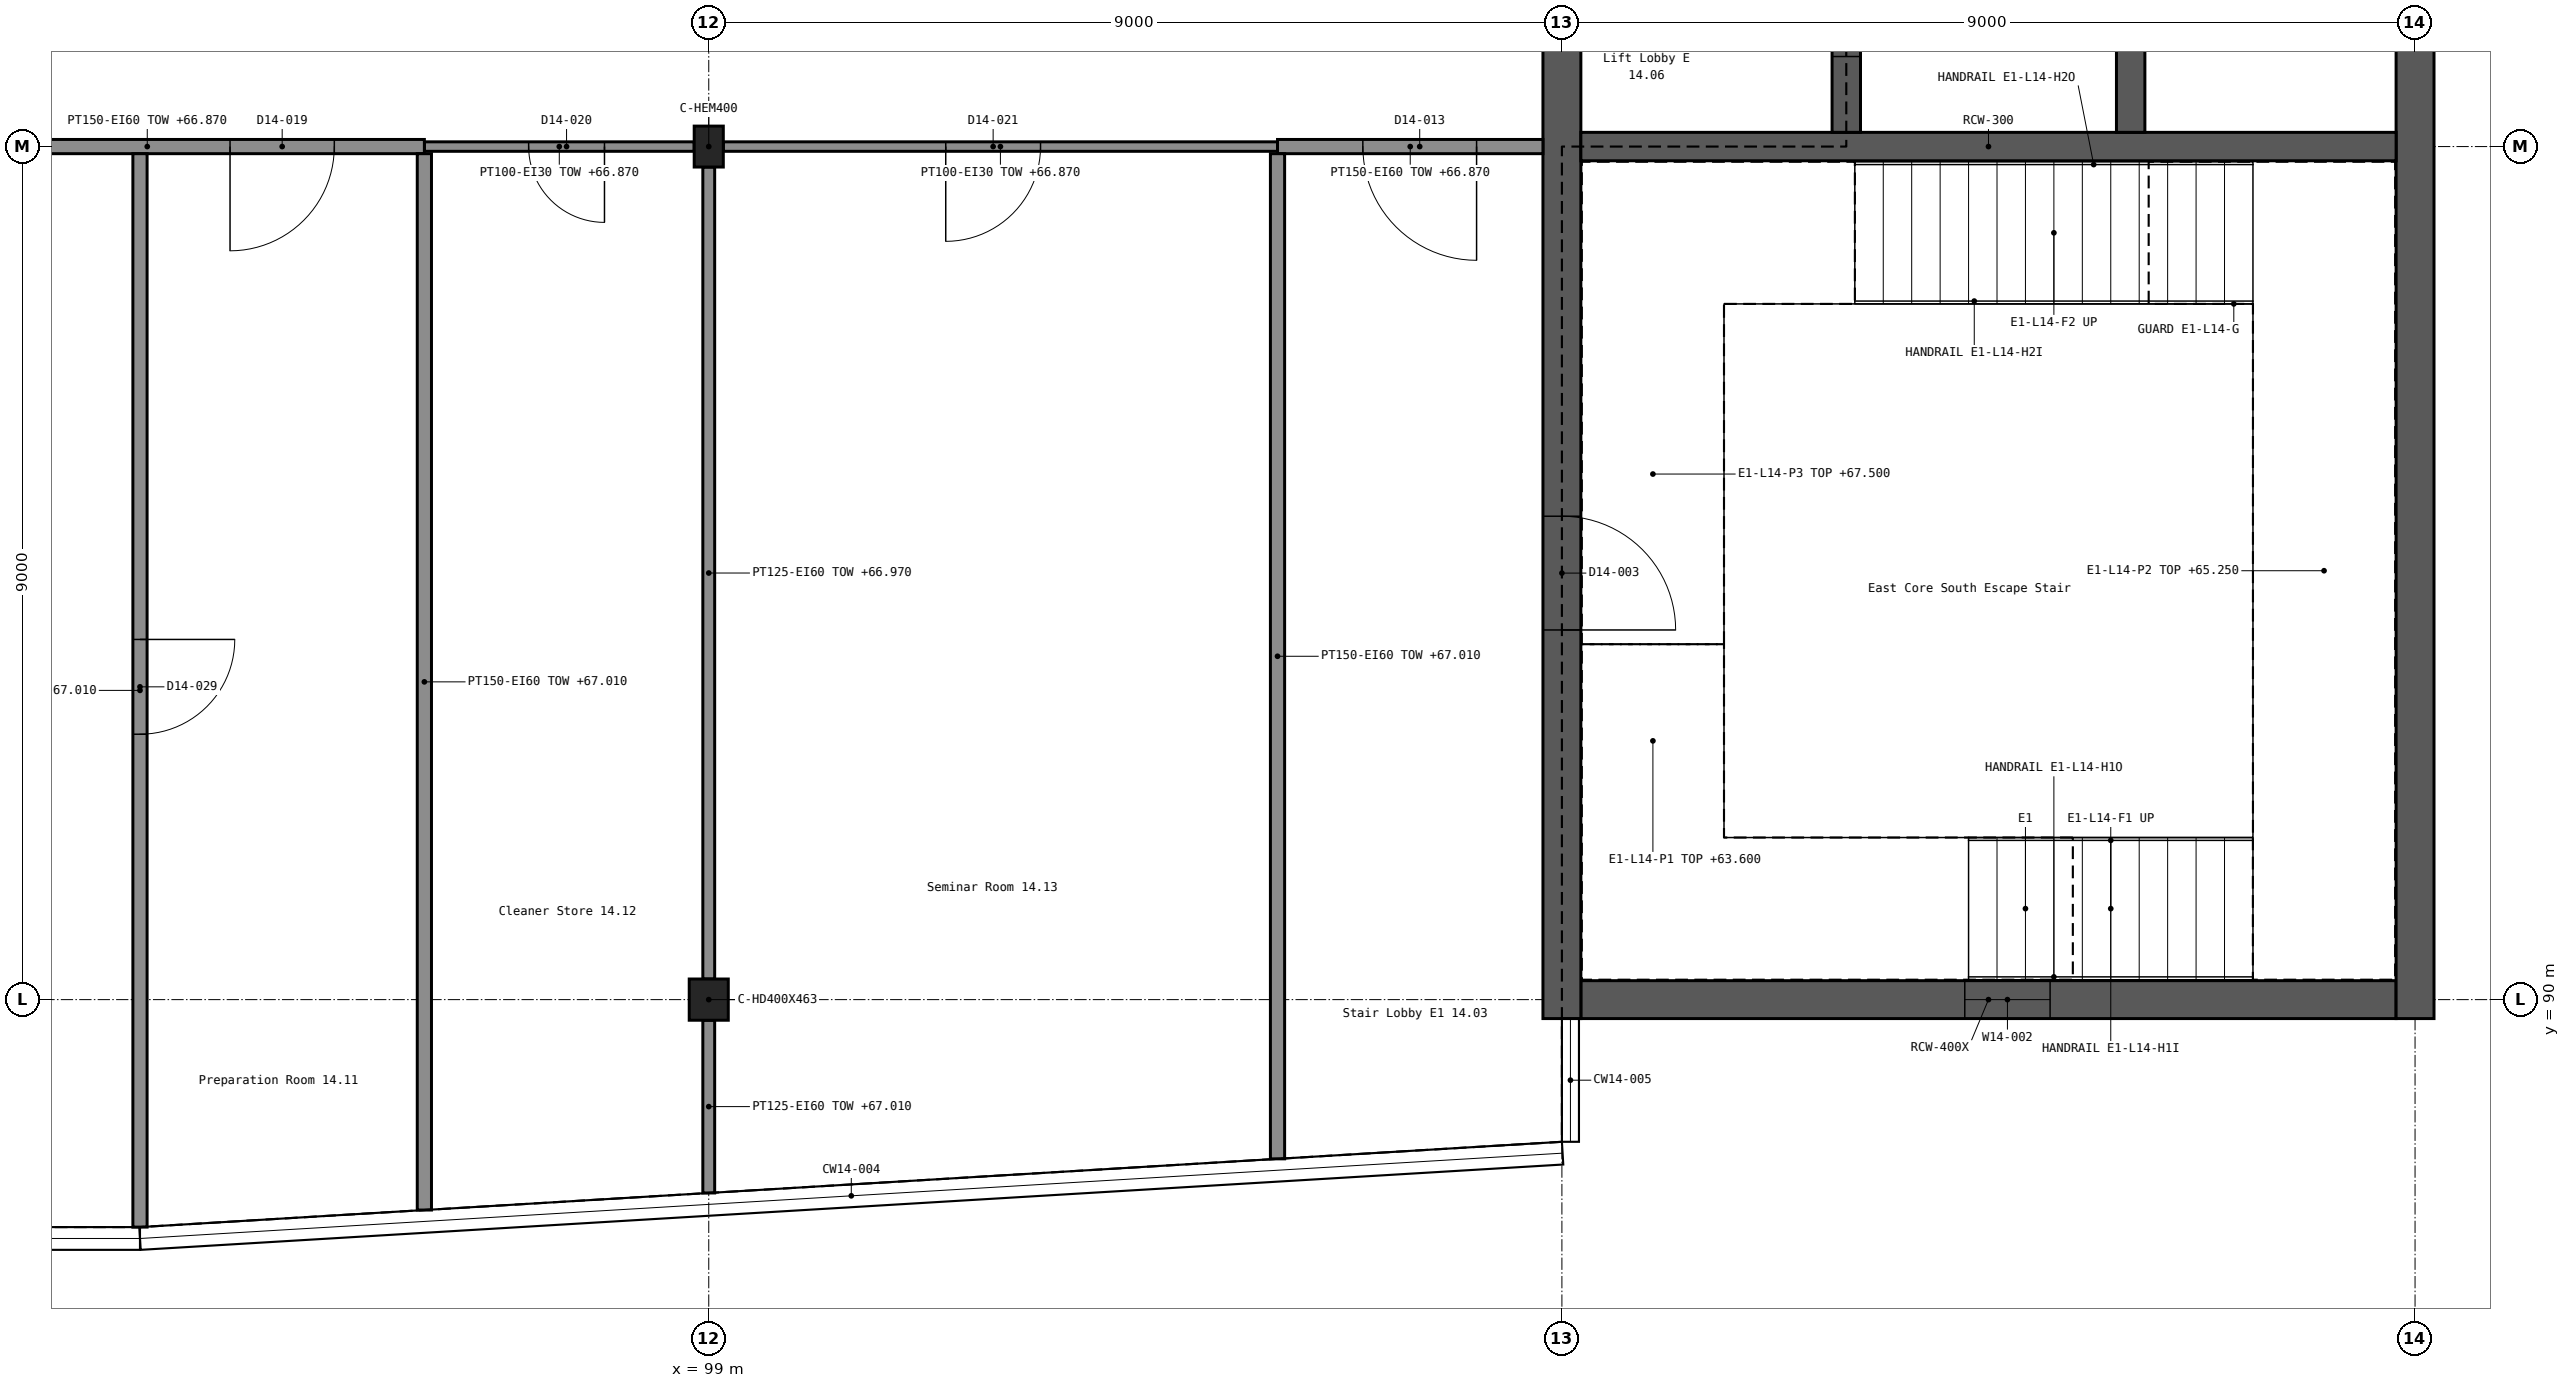
"""IFC4 building model, lengths in metres.
Left out: names, types, materials, properties, quantities, classifications, styles, units other than length and angle.
Written with IfcOpenShell. Run it as: python <this file> out.ifc"""

import sys

from ifc_helpers import new_model, si_unit, direction, frame, frame_2d, origin, origin_2d, place, context, subcontext, project, spatial, rectangle, i_section, extrude, element, fill, save


model = new_model("IFC4")
c1 = context("Model", 3, precision=1e-05, world=origin(), true_north=direction((0.0, 1.0)))
c2 = subcontext(c1, "Body", "Model", "MODEL_VIEW")
j1 = project(units=[si_unit("LENGTHUNIT", "METRE"), si_unit("PLANEANGLEUNIT", "RADIAN")], contexts=[c1])
p1 = place(None, origin())
s1 = spatial("IfcSite", under=j1, at=p1, CompositionType="ELEMENT")
p2 = place(p1, origin())
s2 = spatial("IfcBuilding", under=s1, at=p2, CompositionType="ELEMENT")
p3 = place(p2, frame((0.0, 0.0, 63.6)))
s3 = spatial("IfcBuildingStorey", under=s2, at=p3, CompositionType="ELEMENT", Elevation=63.6)
p4 = place(p3, frame((108.2, 90.0, 0.0), z_axis=(0.0, 0.0, 1.0), x_axis=(1.0, 0.0, 0.0)))
e1 = element("IfcWall", 1, at=p4, inside=s3, PredefinedType="SHEAR", context=c2, shape_type="SweptSolid", body=[
    extrude(rectangle(XDim=8.6, YDim=0.4, at=frame_2d((4.3, 0.0))), origin(), (0.0, 0.0, 1.0), 3.9),
])
p5 = place(p4, frame((4.05, 0.0, 1.2)))
e2 = element("IfcOpeningElement", 2, at=p5, cuts=e1, PredefinedType="OPENING", context=c2, shape_type="SweptSolid", body=[
    extrude(rectangle(XDim=0.9, YDim=1.5, at=frame_2d((0.45, 0.75))), frame((0.0, 0.211, 0.0), z_axis=(0.0, -1.0, 0.0), x_axis=(1.0, 0.0, 0.0)), (0.0, 0.0, 1.0), 0.422),
])
p6 = place(p3, frame((108.0, 89.8, 0.0), z_axis=(0.0, 0.0, 1.0), x_axis=(0.0, 1.0, 0.0)))
e3 = element("IfcWall", 3, at=p6, inside=s3, PredefinedType="SHEAR", context=c2, shape_type="SweptSolid", body=[
    extrude(rectangle(XDim=27.4, YDim=0.4, at=frame_2d((13.7, 0.0))), origin(), (0.0, 0.0, 1.0), 3.9),
])
p7 = place(p6, frame((4.1, 0.0, 0.0)))
e4 = element("IfcOpeningElement", 4, at=p7, cuts=e3, PredefinedType="OPENING", context=c2, shape_type="SweptSolid", body=[
    extrude(rectangle(XDim=1.2, YDim=2.1, at=frame_2d((0.6, 1.05))), frame((0.0, 0.211, 0.0), z_axis=(0.0, -1.0, 0.0), x_axis=(1.0, 0.0, 0.0)), (0.0, 0.0, 1.0), 0.422),
])
p8 = place(p6, frame((22.1, 0.0, 0.0)))
e5 = element("IfcOpeningElement", 5, at=p8, cuts=e3, PredefinedType="OPENING", context=c2, shape_type="SweptSolid", body=[
    extrude(rectangle(XDim=1.2, YDim=2.1, at=frame_2d((0.6, 1.05))), frame((0.0, 0.211, 0.0), z_axis=(0.0, -1.0, 0.0), x_axis=(1.0, 0.0, 0.0)), (0.0, 0.0, 1.0), 0.422),
])
p9 = place(p6, frame((12.5, 0.0, 0.0)))
e6 = element("IfcOpeningElement", 6, at=p9, cuts=e3, PredefinedType="OPENING", context=c2, shape_type="SweptSolid", body=[
    extrude(rectangle(XDim=2.0, YDim=2.1, at=frame_2d((1.0, 1.05))), frame((0.0, 0.211, 0.0), z_axis=(0.0, -1.0, 0.0), x_axis=(1.0, 0.0, 0.0)), (0.0, 0.0, 1.0), 0.422),
])
p10 = place(p3, frame((117.0, 89.8, 0.0), z_axis=(0.0, 0.0, 1.0), x_axis=(0.0, 1.0, 0.0)))
e7 = element("IfcWall", 7, at=p10, inside=s3, PredefinedType="SHEAR", context=c2, shape_type="SweptSolid", body=[
    extrude(rectangle(XDim=27.4, YDim=0.4, at=frame_2d((13.7, 0.0))), origin(), (0.0, 0.0, 1.0), 3.9),
])
p11 = place(p3, frame((108.2, 99.0, 0.0), z_axis=(0.0, 0.0, 1.0), x_axis=(1.0, 0.0, 0.0)))
e8 = element("IfcWall", 8, at=p11, inside=s3, PredefinedType="SHEAR", context=c2, shape_type="SweptSolid", body=[
    extrude(rectangle(XDim=8.6, YDim=0.3, at=frame_2d((4.3, 0.0))), origin(), (0.0, 0.0, 1.0), 3.9),
])
p12 = place(p3, frame((111.0, 99.15, 0.0), z_axis=(0.0, 0.0, 1.0), x_axis=(0.0, 1.0, 0.0)))
e9 = element("IfcWall", 9, at=p12, inside=s3, PredefinedType="SHEAR", context=c2, shape_type="SweptSolid", body=[
    extrude(rectangle(XDim=8.7, YDim=0.3, at=frame_2d((4.35, 0.0))), origin(), (0.0, 0.0, 1.0), 3.9),
])
p13 = place(p12, frame((0.8, 0.0, 0.0)))
e10 = element("IfcOpeningElement", 10, at=p13, cuts=e9, PredefinedType="OPENING", context=c2, shape_type="SweptSolid", body=[
    extrude(rectangle(XDim=1.1, YDim=2.1, at=frame_2d((0.55, 1.05))), frame((0.0, 0.161, 0.0), z_axis=(0.0, -1.0, 0.0), x_axis=(1.0, 0.0, 0.0)), (0.0, 0.0, 1.0), 0.322),
])
p14 = place(p12, frame((3.8, 0.0, 0.0)))
e11 = element("IfcOpeningElement", 11, at=p14, cuts=e9, PredefinedType="OPENING", context=c2, shape_type="SweptSolid", body=[
    extrude(rectangle(XDim=1.1, YDim=2.1, at=frame_2d((0.55, 1.05))), frame((0.0, 0.161, 0.0), z_axis=(0.0, -1.0, 0.0), x_axis=(1.0, 0.0, 0.0)), (0.0, 0.0, 1.0), 0.322),
])
p15 = place(p12, frame((6.8, 0.0, 0.0)))
e12 = element("IfcOpeningElement", 12, at=p15, cuts=e9, PredefinedType="OPENING", context=c2, shape_type="SweptSolid", body=[
    extrude(rectangle(XDim=1.1, YDim=2.1, at=frame_2d((0.55, 1.05))), frame((0.0, 0.161, 0.0), z_axis=(0.0, -1.0, 0.0), x_axis=(1.0, 0.0, 0.0)), (0.0, 0.0, 1.0), 0.322),
])
p16 = place(p3, frame((114.0, 99.15, 0.0), z_axis=(0.0, 0.0, 1.0), x_axis=(0.0, 1.0, 0.0)))
e13 = element("IfcWall", 13, at=p16, inside=s3, PredefinedType="SHEAR", context=c2, shape_type="SweptSolid", body=[
    extrude(rectangle(XDim=8.7, YDim=0.3, at=frame_2d((4.35, 0.0))), origin(), (0.0, 0.0, 1.0), 3.9),
])
p17 = place(p3, frame((99.0, 90.0, 0.0), z_axis=(0.0, 0.0, 1.0), x_axis=(1.0, 0.0, 0.0)))
e14 = element("IfcColumn", 14, at=p17, inside=s3, PredefinedType="COLUMN", context=c2, shape_type="SweptSolid", body=[
    extrude(i_section(OverallWidth=0.412, OverallDepth=0.435, WebThickness=0.036, FlangeThickness=0.057, FilletRadius=0.015, at=origin_2d()), origin(), (0.0, 0.0, 1.0), 3.9),
])
p18 = place(p3, frame((99.0, 99.0, 0.0), z_axis=(0.0, 0.0, 1.0), x_axis=(1.0, 0.0, 0.0)))
e15 = element("IfcColumn", 15, at=p18, inside=s3, PredefinedType="COLUMN", context=c2, shape_type="SweptSolid", body=[
    extrude(i_section(OverallWidth=0.307, OverallDepth=0.432, WebThickness=0.021, FlangeThickness=0.04, FilletRadius=0.027, at=origin_2d()), origin(), (0.0, 0.0, 1.0), 3.9),
])
p19 = place(p3, frame((96.0, 99.0, 0.0), z_axis=(0.0, 0.0, 1.0), x_axis=(1.0, 0.0, 0.0)))
e16 = element("IfcWall", 16, at=p19, inside=s3, PredefinedType="PARTITIONING", context=c2, shape_type="SweptSolid", body=[
    extrude(rectangle(XDim=2.846, YDim=0.1, at=frame_2d((1.423, 0.0))), origin(), (0.0, 0.0, 1.0), 3.27),
])
p20 = place(p19, frame((1.1, 0.0, 0.0)))
e17 = element("IfcOpeningElement", 17, at=p20, cuts=e16, PredefinedType="OPENING", context=c2, shape_type="SweptSolid", body=[
    extrude(rectangle(XDim=0.8, YDim=2.1, at=frame_2d((0.4, 1.05))), frame((0.0, 0.061, 0.0), z_axis=(0.0, -1.0, 0.0), x_axis=(1.0, 0.0, 0.0)), (0.0, 0.0, 1.0), 0.122),
])
p21 = place(p3, frame((99.154, 99.0, 0.0), z_axis=(0.0, 0.0, 1.0), x_axis=(1.0, 0.0, 0.0)))
e18 = element("IfcWall", 18, at=p21, inside=s3, PredefinedType="PARTITIONING", context=c2, shape_type="SweptSolid", body=[
    extrude(rectangle(XDim=5.846, YDim=0.1, at=frame_2d((2.923, 0.0))), origin(), (0.0, 0.0, 1.0), 3.27),
])
p22 = place(p21, frame((2.346, 0.0, 0.0)))
e19 = element("IfcOpeningElement", 19, at=p22, cuts=e18, PredefinedType="OPENING", context=c2, shape_type="SweptSolid", body=[
    extrude(rectangle(XDim=1.0, YDim=2.1, at=frame_2d((0.5, 1.05))), frame((0.0, 0.061, 0.0), z_axis=(0.0, -1.0, 0.0), x_axis=(1.0, 0.0, 0.0)), (0.0, 0.0, 1.0), 0.122),
])
p23 = place(p3, frame((90.154, 99.0, 0.0), z_axis=(0.0, 0.0, 1.0), x_axis=(1.0, 0.0, 0.0)))
e20 = element("IfcWall", 20, at=p23, inside=s3, PredefinedType="PARTITIONING", context=c2, shape_type="SweptSolid", body=[
    extrude(rectangle(XDim=5.846, YDim=0.15, at=frame_2d((2.923, 0.0))), origin(), (0.0, 0.0, 1.0), 3.27),
])
p24 = place(p23, frame((3.796, 0.0, 0.0)))
e21 = element("IfcOpeningElement", 21, at=p24, cuts=e20, PredefinedType="OPENING", context=c2, shape_type="SweptSolid", body=[
    extrude(rectangle(XDim=1.1, YDim=2.4, at=frame_2d((0.55, 1.2))), frame((0.0, 0.086, 0.0), z_axis=(0.0, -1.0, 0.0), x_axis=(1.0, 0.0, 0.0)), (0.0, 0.0, 1.0), 0.172),
])
p25 = place(p3, frame((105.0, 99.0, 0.0), z_axis=(0.0, 0.0, 1.0), x_axis=(1.0, 0.0, 0.0)))
e22 = element("IfcWall", 22, at=p25, inside=s3, PredefinedType="PARTITIONING", context=c2, shape_type="SweptSolid", body=[
    extrude(rectangle(XDim=2.8, YDim=0.15, at=frame_2d((1.4, 0.0))), origin(), (0.0, 0.0, 1.0), 3.27),
])
p26 = place(p25, frame((0.9, 0.0, 0.0)))
e23 = element("IfcOpeningElement", 23, at=p26, cuts=e22, PredefinedType="OPENING", context=c2, shape_type="SweptSolid", body=[
    extrude(rectangle(XDim=1.2, YDim=2.1, at=frame_2d((0.6, 1.05))), frame((0.0, 0.086, 0.0), z_axis=(0.0, -1.0, 0.0), x_axis=(1.0, 0.0, 0.0)), (0.0, 0.0, 1.0), 0.172),
])
p27 = place(p3, frame((93.0, 87.6, 0.0), z_axis=(0.0, 0.0, 1.0), x_axis=(0.0, 1.0, 0.0)))
e24 = element("IfcWall", 24, at=p27, inside=s3, PredefinedType="PARTITIONING", context=c2, shape_type="SweptSolid", body=[
    extrude(rectangle(XDim=11.325, YDim=0.15, at=frame_2d((5.663, 0.0))), origin(), (0.0, 0.0, 1.0), 3.41),
])
p28 = place(p27, frame((5.2, 0.0, 0.0)))
e25 = element("IfcOpeningElement", 25, at=p28, cuts=e24, PredefinedType="OPENING", context=c2, shape_type="SweptSolid", body=[
    extrude(rectangle(XDim=1.0, YDim=2.1, at=frame_2d((0.5, 1.05))), frame((0.0, 0.086, 0.0), z_axis=(0.0, -1.0, 0.0), x_axis=(1.0, 0.0, 0.0)), (0.0, 0.0, 1.0), 0.172),
])
p29 = place(p3, frame((96.0, 87.78, 0.0), z_axis=(0.0, 0.0, 1.0), x_axis=(0.0, 1.0, 0.0)))
e26 = element("IfcWall", 26, at=p29, inside=s3, PredefinedType="PARTITIONING", context=c2, shape_type="SweptSolid", body=[
    extrude(rectangle(XDim=11.145, YDim=0.15, at=frame_2d((5.573, 0.0))), origin(), (0.0, 0.0, 1.0), 3.41),
])
p30 = place(p3, frame((99.0, 87.96, 0.0), z_axis=(0.0, 0.0, 1.0), x_axis=(0.0, 1.0, 0.0)))
e27 = element("IfcWall", 27, at=p30, inside=s3, PredefinedType="PARTITIONING", context=c2, shape_type="SweptSolid", body=[
    extrude(rectangle(XDim=1.823, YDim=0.125, at=frame_2d((0.911, 0.0))), origin(), (0.0, 0.0, 1.0), 3.41),
])
p31 = place(p3, frame((99.0, 90.218, 0.0), z_axis=(0.0, 0.0, 1.0), x_axis=(0.0, 1.0, 0.0)))
e28 = element("IfcWall", 28, at=p31, inside=s3, PredefinedType="PARTITIONING", context=c2, shape_type="SweptSolid", body=[
    extrude(rectangle(XDim=8.566, YDim=0.125, at=frame_2d((4.283, 0.0))), origin(), (0.0, 0.0, 1.0), 3.37),
])
p32 = place(p3, frame((105.0, 88.32, 0.0), z_axis=(0.0, 0.0, 1.0), x_axis=(0.0, 1.0, 0.0)))
e29 = element("IfcWall", 29, at=p32, inside=s3, PredefinedType="PARTITIONING", context=c2, shape_type="SweptSolid", body=[
    extrude(rectangle(XDim=10.605, YDim=0.15, at=frame_2d((5.302, 0.0))), origin(), (0.0, 0.0, 1.0), 3.41),
])
p33 = place(p5, origin())
e30 = element("IfcWindow", 30, at=p33, inside=s3, PartitioningType="SINGLE_PANEL", PredefinedType="WINDOW", context=c2, shape_type="SweptSolid", body=[
    extrude(rectangle(XDim=0.9, YDim=1.5, at=frame_2d((0.45, 0.75))), frame((0.0, 0.03, 0.0), z_axis=(0.0, -1.0, 0.0), x_axis=(1.0, 0.0, 0.0)), (0.0, 0.0, 1.0), 0.06),
])
fill(e2, e30)
p34 = place(p7, frame((1.2, 0.0, 0.0), z_axis=(0.0, 0.0, 1.0), x_axis=(-1.0, 0.0, 0.0)))
e31 = element("IfcDoor", 31, at=p34, inside=s3, OperationType="SINGLE_SWING_RIGHT", PredefinedType="DOOR", context=c2, shape_type="SweptSolid", body=[
    extrude(rectangle(XDim=1.2, YDim=2.1, at=frame_2d((0.6, 1.05))), frame((0.0, 0.025, 0.0), z_axis=(0.0, -1.0, 0.0), x_axis=(1.0, 0.0, 0.0)), (0.0, 0.0, 1.0), 0.05),
])
fill(e4, e31)
p35 = place(p13, origin())
e32 = element("IfcDoor", 32, at=p35, inside=s3, OperationType="DOUBLE_DOOR_SLIDING", PredefinedType="DOOR", context=c2, shape_type="SweptSolid", body=[
    extrude(rectangle(XDim=1.1, YDim=2.1, at=frame_2d((0.55, 1.05))), frame((0.0, 0.025, 0.0), z_axis=(0.0, -1.0, 0.0), x_axis=(1.0, 0.0, 0.0)), (0.0, 0.0, 1.0), 0.05),
])
fill(e10, e32)
p36 = place(p26, frame((1.2, 0.0, 0.0), z_axis=(0.0, 0.0, 1.0), x_axis=(-1.0, 0.0, 0.0)))
e33 = element("IfcDoor", 33, at=p36, inside=s3, OperationType="SINGLE_SWING_LEFT", PredefinedType="DOOR", context=c2, shape_type="SweptSolid", body=[
    extrude(rectangle(XDim=1.2, YDim=2.1, at=frame_2d((0.6, 1.05))), frame((0.0, 0.025, 0.0), z_axis=(0.0, -1.0, 0.0), x_axis=(1.0, 0.0, 0.0)), (0.0, 0.0, 1.0), 0.05),
])
fill(e23, e33)
p37 = place(p24, frame((1.1, 0.0, 0.0), z_axis=(0.0, 0.0, 1.0), x_axis=(-1.0, 0.0, 0.0)))
e34 = element("IfcDoor", 34, at=p37, inside=s3, OperationType="SINGLE_SWING_RIGHT", PredefinedType="DOOR", context=c2, shape_type="SweptSolid", body=[
    extrude(rectangle(XDim=1.1, YDim=2.4, at=frame_2d((0.55, 1.2))), frame((0.0, 0.025, 0.0), z_axis=(0.0, -1.0, 0.0), x_axis=(1.0, 0.0, 0.0)), (0.0, 0.0, 1.0), 0.05),
])
fill(e21, e34)
p38 = place(p20, frame((0.8, 0.0, 0.0), z_axis=(0.0, 0.0, 1.0), x_axis=(-1.0, 0.0, 0.0)))
e35 = element("IfcDoor", 35, at=p38, inside=s3, OperationType="SINGLE_SWING_LEFT", PredefinedType="DOOR", context=c2, shape_type="SweptSolid", body=[
    extrude(rectangle(XDim=0.8, YDim=2.1, at=frame_2d((0.4, 1.05))), frame((0.0, 0.025, 0.0), z_axis=(0.0, -1.0, 0.0), x_axis=(1.0, 0.0, 0.0)), (0.0, 0.0, 1.0), 0.05),
])
fill(e17, e35)
p39 = place(p22, frame((1.0, 0.0, 0.0), z_axis=(0.0, 0.0, 1.0), x_axis=(-1.0, 0.0, 0.0)))
e36 = element("IfcDoor", 36, at=p39, inside=s3, OperationType="SINGLE_SWING_RIGHT", PredefinedType="DOOR", context=c2, shape_type="SweptSolid", body=[
    extrude(rectangle(XDim=1.0, YDim=2.1, at=frame_2d((0.5, 1.05))), frame((0.0, 0.025, 0.0), z_axis=(0.0, -1.0, 0.0), x_axis=(1.0, 0.0, 0.0)), (0.0, 0.0, 1.0), 0.05),
])
fill(e19, e36)
p40 = place(p28, frame((1.0, 0.0, 0.0), z_axis=(0.0, 0.0, 1.0), x_axis=(-1.0, 0.0, 0.0)))
e37 = element("IfcDoor", 37, at=p40, inside=s3, OperationType="SINGLE_SWING_LEFT", PredefinedType="DOOR", context=c2, shape_type="SweptSolid", body=[
    extrude(rectangle(XDim=1.0, YDim=2.1, at=frame_2d((0.5, 1.05))), frame((0.0, 0.025, 0.0), z_axis=(0.0, -1.0, 0.0), x_axis=(1.0, 0.0, 0.0)), (0.0, 0.0, 1.0), 0.05),
])
fill(e25, e37)
save(model, sys.argv[1])
